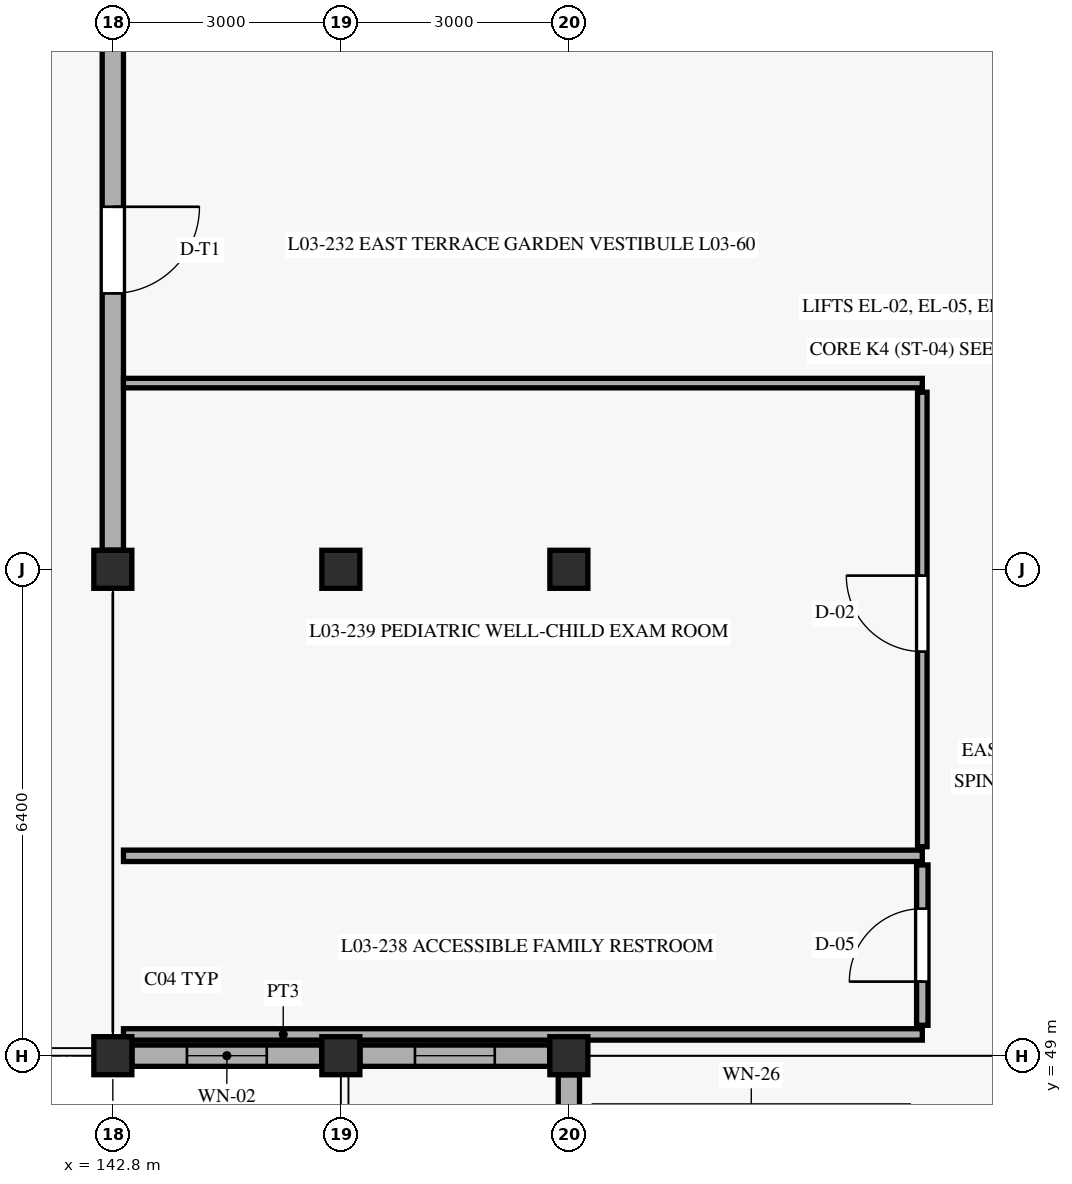
"""IFC4 building model, lengths in metres.
Left out: names, types, materials, properties, quantities, classifications, styles, units other than length and angle.
Written with IfcOpenShell. Run it as: python <this file> out.ifc"""

import sys

from ifc_helpers import new_model, si_unit, direction, frame, frame_2d, origin, origin_with_axes, origin_2d, place, context, subcontext, project, spatial, rectangle, extrude, element, fill, save


model = new_model("IFC4")
c1 = context("Model", 3, precision=1e-05, world=origin(), true_north=direction((0.0, 1.0)))
c2 = subcontext(c1, "Body", "Model", "MODEL_VIEW")
j1 = project(units=[si_unit("LENGTHUNIT", "METRE"), si_unit("PLANEANGLEUNIT", "RADIAN")], contexts=[c1])
p1 = place(None, origin())
s1 = spatial("IfcSite", under=j1, at=p1, CompositionType="ELEMENT")
p2 = place(p1, origin())
s2 = spatial("IfcBuilding", under=s1, at=p2, CompositionType="ELEMENT")
p3 = place(p2, frame((0.0, 0.0, 9.3)))
s3 = spatial("IfcBuildingStorey", under=s2, at=p3, CompositionType="ELEMENT", Elevation=9.3)
for number, where, z_axis, x_axis in (
    (1, (142.8, 49.0, 0.0), (0.0, 0.0, 1.0), (1.0, 0.0, 0.0)),
    (2, (142.8, 55.4, 0.0), (0.0, 0.0, 1.0), (1.0, 0.0, 0.0)),
    (3, (145.8, 49.0, 0.0), (0.0, 0.0, 1.0), (1.0, 0.0, 0.0)),
    (4, (145.8, 55.4, 0.0), (0.0, 0.0, 1.0), (1.0, 0.0, 0.0)),
    (5, (148.8, 49.0, 0.0), (0.0, 0.0, 1.0), (1.0, 0.0, 0.0)),
    (6, (148.8, 55.4, 0.0), (0.0, 0.0, 1.0), (1.0, 0.0, 0.0)),
):
    element("IfcColumn", number, at=place(p3, frame(where, z_axis=z_axis, x_axis=x_axis)), inside=s3, PredefinedType="COLUMN", context=c2, shape_type="SweptSolid", body=[
        extrude(rectangle(XDim=0.5, YDim=0.5, at=origin_2d()), origin(), (0.0, 0.0, 1.0), 4.2),
    ])
p4 = place(p3, frame((148.8, 48.748, 0.0), z_axis=(0.0, 0.0, 1.0), x_axis=(0.0, -1.0, 0.0)))
e7 = element("IfcWall", 7, at=p4, inside=s3, PredefinedType="SOLIDWALL", context=c2, shape_type="SweptSolid", body=[
    extrude(rectangle(XDim=5.896, YDim=0.28, at=frame_2d((2.948, 0.0))), origin(), (0.0, 0.0, 1.0), 3.57),
])
p5 = place(p4, frame((1.923, 0.0, 0.8)))
e8 = element("IfcOpeningElement", 8, at=p5, cuts=e7, PredefinedType="OPENING", context=c2, shape_type="SweptSolid", body=[
    extrude(rectangle(XDim=2.05, YDim=1.95, at=frame_2d((1.025, 0.975))), frame((0.0, 0.15, 0.0), z_axis=(0.0, -1.0, 0.0), x_axis=(1.0, 0.0, 0.0)), (0.0, 0.0, 1.0), 0.3),
])
p6 = place(p3, frame((142.8, 63.548, 0.0), z_axis=(0.0, 0.0, 1.0), x_axis=(0.0, -1.0, 0.0)))
e9 = element("IfcWall", 9, at=p6, inside=s3, PredefinedType="SOLIDWALL", context=c2, shape_type="SweptSolid", body=[
    extrude(rectangle(XDim=7.896, YDim=0.28, at=frame_2d((3.948, 0.0))), origin(), (0.0, 0.0, 1.0), 3.49),
])
p7 = place(p6, frame((3.378, 0.0, 0.0)))
e10 = element("IfcOpeningElement", 10, at=p7, cuts=e9, PredefinedType="OPENING", context=c2, shape_type="SweptSolid", body=[
    extrude(rectangle(XDim=1.14, YDim=2.3, at=frame_2d((0.57, 1.15))), frame((0.0, 0.15, 0.0), z_axis=(0.0, -1.0, 0.0), x_axis=(1.0, 0.0, 0.0)), (0.0, 0.0, 1.0), 0.3),
])
p8 = place(p3, frame((143.052, 49.0, 0.0), z_axis=(0.0, 0.0, 1.0), x_axis=(1.0, 0.0, 0.0)))
e11 = element("IfcWall", 11, at=p8, inside=s3, PredefinedType="SOLIDWALL", context=c2, shape_type="SweptSolid", body=[
    extrude(rectangle(XDim=2.496, YDim=0.28, at=frame_2d((1.248, 0.0))), origin(), (0.0, 0.0, 1.0), 3.59),
])
p9 = place(p8, frame((0.723, 0.0, 0.88)))
e12 = element("IfcOpeningElement", 12, at=p9, cuts=e11, PredefinedType="OPENING", context=c2, shape_type="SweptSolid", body=[
    extrude(rectangle(XDim=1.05, YDim=2.2, at=frame_2d((0.525, 1.1))), frame((0.0, 0.15, 0.0), z_axis=(0.0, -1.0, 0.0), x_axis=(1.0, 0.0, 0.0)), (0.0, 0.0, 1.0), 0.3),
])
p10 = place(p3, frame((146.052, 49.0, 0.0), z_axis=(0.0, 0.0, 1.0), x_axis=(1.0, 0.0, 0.0)))
e13 = element("IfcWall", 13, at=p10, inside=s3, PredefinedType="SOLIDWALL", context=c2, shape_type="SweptSolid", body=[
    extrude(rectangle(XDim=2.496, YDim=0.28, at=frame_2d((1.248, 0.0))), origin(), (0.0, 0.0, 1.0), 3.59),
])
p11 = place(p10, frame((0.723, 0.0, 0.88)))
e14 = element("IfcOpeningElement", 14, at=p11, cuts=e13, PredefinedType="OPENING", context=c2, shape_type="SweptSolid", body=[
    extrude(rectangle(XDim=1.05, YDim=2.2, at=frame_2d((0.525, 1.1))), frame((0.0, 0.15, 0.0), z_axis=(0.0, -1.0, 0.0), x_axis=(1.0, 0.0, 0.0)), (0.0, 0.0, 1.0), 0.3),
])
p12 = place(p3, frame((153.45, 49.4, 0.0), z_axis=(0.0, 0.0, 1.0), x_axis=(0.0, 1.0, 0.0)))
e15 = element("IfcWall", 15, at=p12, inside=s3, PredefinedType="PARTITIONING", context=c2, shape_type="SweptSolid", body=[
    extrude(rectangle(XDim=2.11, YDim=0.15, at=frame_2d((1.055, 0.0))), origin(), (0.0, 0.0, 1.0), 3.895),
])
p13 = place(p12, frame((0.575, 0.0, 0.0)))
e16 = element("IfcOpeningElement", 16, at=p13, cuts=e15, PredefinedType="OPENING", context=c2, shape_type="SweptSolid", body=[
    extrude(rectangle(XDim=0.96, YDim=2.1, at=frame_2d((0.48, 1.05))), frame((0.0, 0.085, 0.0), z_axis=(0.0, -1.0, 0.0), x_axis=(1.0, 0.0, 0.0)), (0.0, 0.0, 1.0), 0.17),
])
for number, where, z_axis, x_axis in (
    (17, (142.94, 49.28, 0.0), (0.0, 0.0, 1.0), (1.0, 0.0, 0.0)),
    (18, (142.94, 51.63, 0.0), (0.0, 0.0, 1.0), (1.0, 0.0, 0.0)),
):
    element("IfcWall", number, at=place(p3, frame(where, z_axis=z_axis, x_axis=x_axis)), inside=s3, PredefinedType="PARTITIONING", context=c2, shape_type="SweptSolid", body=[
        extrude(rectangle(XDim=10.51, YDim=0.15, at=frame_2d((5.255, 0.0))), origin(), (0.0, 0.0, 1.0), 3.485),
    ])
p14 = place(p3, frame((153.45, 51.75, 0.0), z_axis=(0.0, 0.0, 1.0), x_axis=(0.0, 1.0, 0.0)))
e19 = element("IfcWall", 19, at=p14, inside=s3, PredefinedType="PARTITIONING", context=c2, shape_type="SweptSolid", body=[
    extrude(rectangle(XDim=5.98, YDim=0.125, at=frame_2d((2.99, 0.0))), origin(), (0.0, 0.0, 1.0), 3.495),
])
p15 = place(p14, frame((2.567, 0.0, 0.0)))
e20 = element("IfcOpeningElement", 20, at=p15, cuts=e19, PredefinedType="OPENING", context=c2, shape_type="SweptSolid", body=[
    extrude(rectangle(XDim=1.0, YDim=2.15, at=frame_2d((0.5, 1.075))), frame((0.0, 0.073, 0.0), z_axis=(0.0, -1.0, 0.0), x_axis=(1.0, 0.0, 0.0)), (0.0, 0.0, 1.0), 0.145),
])
p16 = place(p3, frame((142.94, 57.85, 0.0), z_axis=(0.0, 0.0, 1.0), x_axis=(1.0, 0.0, 0.0)))
e21 = element("IfcWall", 21, at=p16, inside=s3, PredefinedType="PARTITIONING", context=c2, shape_type="SweptSolid", body=[
    extrude(rectangle(XDim=10.51, YDim=0.125, at=frame_2d((5.255, 0.0))), origin(), (0.0, 0.0, 1.0), 3.485),
])
p17 = place(p7, frame((1.14, 0.0, 0.0), z_axis=(0.0, 0.0, 1.0), x_axis=(-1.0, 0.0, 0.0)))
e22 = element("IfcDoor", 22, at=p17, inside=s3, OperationType="SINGLE_SWING_RIGHT", PredefinedType="DOOR", context=c2, shape_type="SweptSolid", body=[
    extrude(rectangle(XDim=1.14, YDim=2.3, at=frame_2d((0.57, 1.15))), frame((0.0, 0.025, 0.0), z_axis=(0.0, -1.0, 0.0), x_axis=(1.0, 0.0, 0.0)), (0.0, 0.0, 1.0), 0.05),
])
fill(e10, e22)
p18 = place(p9, origin_with_axes())
e23 = element("IfcWindow", 23, at=p18, inside=s3, PartitioningType="SINGLE_PANEL", PredefinedType="WINDOW", context=c2, shape_type="SweptSolid", body=[
    extrude(rectangle(XDim=1.05, YDim=2.2, at=frame_2d((0.525, 1.1))), frame((0.0, 0.03, 0.0), z_axis=(0.0, -1.0, 0.0), x_axis=(1.0, 0.0, 0.0)), (0.0, 0.0, 1.0), 0.06),
])
fill(e12, e23)
p19 = place(p11, origin_with_axes())
e24 = element("IfcWindow", 24, at=p19, inside=s3, PartitioningType="SINGLE_PANEL", PredefinedType="WINDOW", context=c2, shape_type="SweptSolid", body=[
    extrude(rectangle(XDim=1.05, YDim=2.2, at=frame_2d((0.525, 1.1))), frame((0.0, 0.03, 0.0), z_axis=(0.0, -1.0, 0.0), x_axis=(1.0, 0.0, 0.0)), (0.0, 0.0, 1.0), 0.06),
])
fill(e14, e24)
p20 = place(p13, origin_with_axes())
e25 = element("IfcDoor", 25, at=p20, inside=s3, OperationType="SINGLE_SWING_LEFT", PredefinedType="DOOR", context=c2, shape_type="SweptSolid", body=[
    extrude(rectangle(XDim=0.96, YDim=2.1, at=frame_2d((0.48, 1.05))), frame((0.0, 0.025, 0.0), z_axis=(0.0, -1.0, 0.0), x_axis=(1.0, 0.0, 0.0)), (0.0, 0.0, 1.0), 0.05),
])
fill(e16, e25)
p21 = place(p15, origin_with_axes())
e26 = element("IfcDoor", 26, at=p21, inside=s3, OperationType="SINGLE_SWING_RIGHT", PredefinedType="DOOR", context=c2, shape_type="SweptSolid", body=[
    extrude(rectangle(XDim=1.0, YDim=2.15, at=frame_2d((0.5, 1.075))), frame((0.0, 0.025, 0.0), z_axis=(0.0, -1.0, 0.0), x_axis=(1.0, 0.0, 0.0)), (0.0, 0.0, 1.0), 0.05),
])
fill(e20, e26)
save(model, sys.argv[1])
